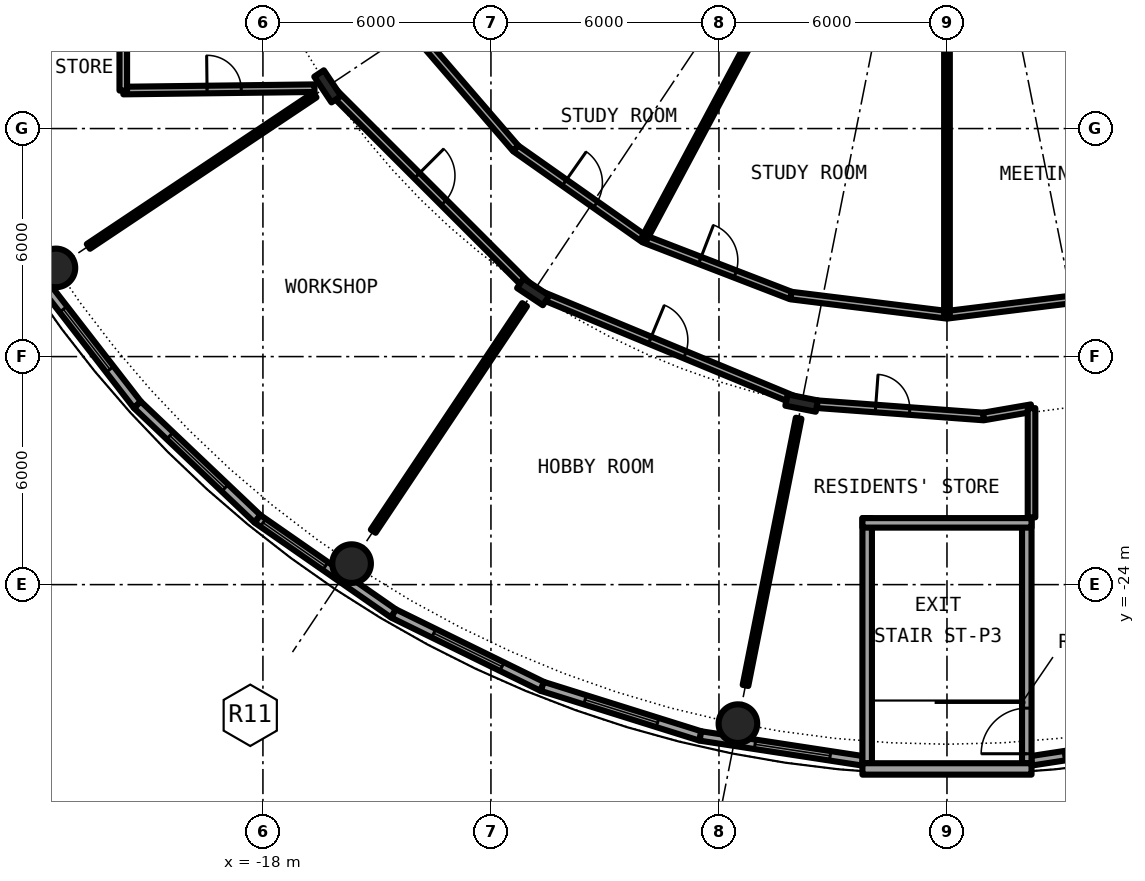
"""IFC4 building model, lengths in metres.
Left out: names, types, materials, properties, quantities, classifications, styles, units other than length and angle.
Written with IfcOpenShell. Run it as: python <this file> out.ifc"""

import sys

from ifc_helpers import new_model, si_unit, direction, frame, frame_2d, origin, origin_2d, place, context, subcontext, project, spatial, rectangle, hollow_circle, i_section, extrude, element, fill, save


model = new_model("IFC4")
c1 = context("Model", 3, precision=1e-05, world=origin(), true_north=direction((0.0, 1.0)))
c2 = subcontext(c1, "Body", "Model", "MODEL_VIEW")
j1 = project(units=[si_unit("LENGTHUNIT", "METRE"), si_unit("PLANEANGLEUNIT", "RADIAN")], contexts=[c1])
p1 = place(None, origin())
s1 = spatial("IfcSite", under=j1, at=p1, CompositionType="ELEMENT")
p2 = place(p1, origin())
s2 = spatial("IfcBuilding", under=s1, at=p2, CompositionType="ELEMENT")
p3 = place(p2, frame((0.0, 0.0, 14.1)))
s3 = spatial("IfcBuildingStorey", under=s2, at=p3, CompositionType="ELEMENT", Elevation=14.1)
for number, where, z_axis, x_axis in (
    (1, (-23.448, -15.667, 0.0), (0.0, 0.0, 1.0), (1.0, 0.0, 0.0)),
    (2, (-15.667, -23.448, 0.0), (0.0, 0.0, 1.0), (1.0, 0.0, 0.0)),
    (3, (-5.501, -27.658, 0.0), (0.0, 0.0, 1.0), (1.0, 0.0, 0.0)),
):
    element("IfcColumn", number, at=place(p3, frame(where, z_axis=z_axis, x_axis=x_axis)), inside=s3, PredefinedType="COLUMN", context=c2, shape_type="SweptSolid", body=[
        extrude(hollow_circle(Radius=0.508, WallThickness=0.05, at=origin_2d()), origin(), (0.0, 0.0, 1.0), 4.2),
    ])
for number, where, z_axis, x_axis in (
    (4, (-16.297, -10.889, 0.0), (0.0, 0.0, 1.0), (-0.831, -0.556, 0.0)),
    (5, (-10.889, -16.297, 0.0), (0.0, 0.0, 1.0), (-0.556, -0.831, 0.0)),
    (6, (-3.824, -19.223, 0.0), (0.0, 0.0, 1.0), (-0.195, -0.981, 0.0)),
):
    element("IfcColumn", number, at=place(p3, frame(where, z_axis=z_axis, x_axis=x_axis)), inside=s3, PredefinedType="COLUMN", context=c2, shape_type="SweptSolid", body=[
        extrude(i_section(OverallWidth=0.303, OverallDepth=0.814, WebThickness=0.021, FlangeThickness=0.04, FilletRadius=0.03, at=origin_2d()), origin(), (0.0, 0.0, 1.0), 4.2),
    ])
p4 = place(p3, frame((-23.975, -15.822, 0.0), z_axis=(0.0, 0.0, 1.0), x_axis=(0.612637256412, -0.790364214812, 0.0)))
e7 = element("IfcWall", 7, at=p4, inside=s3, PredefinedType="SOLIDWALL", context=c2, shape_type="SweptSolid", body=[
    extrude(rectangle(XDim=4.36, YDim=0.25, at=frame_2d((2.18, 0.0))), origin(), (0.0, 0.0, 1.0), 3.8),
])
p5 = place(p4, frame((1.18, 0.0, 0.9)))
e8 = element("IfcOpeningElement", 8, at=p5, cuts=e7, PredefinedType="OPENING", context=c2, shape_type="SweptSolid", body=[
    extrude(rectangle(XDim=2.0, YDim=2.4, at=frame_2d((1.0, 1.2))), frame((0.0, 0.135, 0.0), z_axis=(0.0, -1.0, 0.0), x_axis=(1.0, 0.0, 0.0)), (0.0, 0.0, 1.0), 0.27),
])
p6 = place(p3, frame((-21.304, -19.268, 0.0), z_axis=(0.0, 0.0, 1.0), x_axis=(0.725101501119, -0.68864200647, 0.0)))
e9 = element("IfcWall", 9, at=p6, inside=s3, PredefinedType="SOLIDWALL", context=c2, shape_type="SweptSolid", body=[
    extrude(rectangle(XDim=4.359, YDim=0.25, at=frame_2d((2.18, 0.0))), origin(), (0.0, 0.0, 1.0), 3.8),
])
p7 = place(p6, frame((1.18, 0.0, 0.9)))
e10 = element("IfcOpeningElement", 10, at=p7, cuts=e9, PredefinedType="OPENING", context=c2, shape_type="SweptSolid", body=[
    extrude(rectangle(XDim=2.0, YDim=2.4, at=frame_2d((1.0, 1.2))), frame((0.0, 0.135, 0.0), z_axis=(0.0, -1.0, 0.0), x_axis=(1.0, 0.0, 0.0)), (0.0, 0.0, 1.0), 0.27),
])
p8 = place(p3, frame((-18.143, -22.27, 0.0), z_axis=(0.0, 0.0, 1.0), x_axis=(0.820990800869, -0.57094141984, 0.0)))
e11 = element("IfcWall", 11, at=p8, inside=s3, PredefinedType="SOLIDWALL", context=c2, shape_type="SweptSolid", body=[
    extrude(rectangle(XDim=4.359, YDim=0.25, at=frame_2d((2.18, 0.0))), origin(), (0.0, 0.0, 1.0), 3.8),
])
p9 = place(p8, frame((0.177, 0.0, 0.9)))
e12 = element("IfcOpeningElement", 12, at=p9, cuts=e11, PredefinedType="OPENING", context=c2, shape_type="SweptSolid", body=[
    extrude(rectangle(XDim=2.0, YDim=2.4, at=frame_2d((1.0, 1.2))), frame((0.0, 0.135, 0.0), z_axis=(0.0, -1.0, 0.0), x_axis=(1.0, 0.0, 0.0)), (0.0, 0.0, 1.0), 0.27),
])
p10 = place(p3, frame((-14.564, -24.759, 0.0), z_axis=(0.0, 0.0, 1.0), x_axis=(0.897938079481, -0.440121807478, 0.0)))
e13 = element("IfcWall", 13, at=p10, inside=s3, PredefinedType="SOLIDWALL", context=c2, shape_type="SweptSolid", body=[
    extrude(rectangle(XDim=4.36, YDim=0.25, at=frame_2d((2.18, 0.0))), origin(), (0.0, 0.0, 1.0), 3.8),
])
p11 = place(p10, frame((1.18, 0.0, 0.9)))
e14 = element("IfcOpeningElement", 14, at=p11, cuts=e13, PredefinedType="OPENING", context=c2, shape_type="SweptSolid", body=[
    extrude(rectangle(XDim=2.0, YDim=2.4, at=frame_2d((1.0, 1.2))), frame((0.0, 0.135, 0.0), z_axis=(0.0, -1.0, 0.0), x_axis=(1.0, 0.0, 0.0)), (0.0, 0.0, 1.0), 0.27),
])
p12 = place(p3, frame((-10.649, -26.678, 0.0), z_axis=(0.0, 0.0, 1.0), x_axis=(0.954219534331, -0.299107138498, 0.0)))
e15 = element("IfcWall", 15, at=p12, inside=s3, PredefinedType="SOLIDWALL", context=c2, shape_type="SweptSolid", body=[
    extrude(rectangle(XDim=4.359, YDim=0.25, at=frame_2d((2.18, 0.0))), origin(), (0.0, 0.0, 1.0), 3.8),
])
p13 = place(p12, frame((1.18, 0.0, 0.9)))
e16 = element("IfcOpeningElement", 16, at=p13, cuts=e15, PredefinedType="OPENING", context=c2, shape_type="SweptSolid", body=[
    extrude(rectangle(XDim=2.0, YDim=2.4, at=frame_2d((1.0, 1.2))), frame((0.0, 0.135, 0.0), z_axis=(0.0, -1.0, 0.0), x_axis=(1.0, 0.0, 0.0)), (0.0, 0.0, 1.0), 0.27),
])
p14 = place(p3, frame((-6.489, -27.982, 0.0), z_axis=(0.0, 0.0, 1.0), x_axis=(0.988472895049, -0.151397938406, 0.0)))
e17 = element("IfcWall", 17, at=p14, inside=s3, PredefinedType="SOLIDWALL", context=c2, shape_type="SweptSolid", body=[
    extrude(rectangle(XDim=4.314, YDim=0.25, at=frame_2d((2.157, 0.0))), origin(), (0.0, 0.0, 1.0), 3.8),
])
p15 = place(p14, frame((1.455, 0.0, 0.9)))
e18 = element("IfcOpeningElement", 18, at=p15, cuts=e17, PredefinedType="OPENING", context=c2, shape_type="SweptSolid", body=[
    extrude(rectangle(XDim=2.0, YDim=2.4, at=frame_2d((1.0, 1.2))), frame((0.0, 0.135, 0.0), z_axis=(0.0, -1.0, 0.0), x_axis=(1.0, 0.0, 0.0)), (0.0, 0.0, 1.0), 0.27),
])
p16 = place(p3, frame((2.225, -28.635, 0.0), z_axis=(0.0, 0.0, 1.0), x_axis=(0.988472895049, 0.151397938406, 0.0)))
e19 = element("IfcWall", 19, at=p16, inside=s3, PredefinedType="SOLIDWALL", context=c2, shape_type="SweptSolid", body=[
    extrude(rectangle(XDim=4.314, YDim=0.25, at=frame_2d((2.157, 0.0))), origin(), (0.0, 0.0, 1.0), 3.8),
])
p17 = place(p16, frame((0.859, 0.0, 0.9)))
e20 = element("IfcOpeningElement", 20, at=p17, cuts=e19, PredefinedType="OPENING", context=c2, shape_type="SweptSolid", body=[
    extrude(rectangle(XDim=2.0, YDim=2.4, at=frame_2d((1.0, 1.2))), frame((0.0, 0.135, 0.0), z_axis=(0.0, -1.0, 0.0), x_axis=(1.0, 0.0, 0.0)), (0.0, 0.0, 1.0), 0.27),
])
p18 = place(p3, frame((2.1, -28.7, 0.0), z_axis=(0.0, 0.0, 1.0), x_axis=(0.0, 1.0, 0.0)))
e21 = element("IfcWall", 21, at=p18, inside=s3, PredefinedType="SHEAR", context=c2, shape_type="SweptSolid", body=[
    extrude(rectangle(XDim=6.45, YDim=0.25, at=frame_2d((3.225, 0.0))), origin(), (0.0, 0.0, 1.0), 4.2),
])
p19 = place(p18, frame((0.25, 0.0, 0.0)))
e22 = element("IfcOpeningElement", 22, at=p19, cuts=e21, PredefinedType="OPENING", context=c2, shape_type="SweptSolid", body=[
    extrude(rectangle(XDim=1.2, YDim=2.3, at=frame_2d((0.6, 1.15))), frame((0.0, 0.135, 0.0), z_axis=(0.0, -1.0, 0.0), x_axis=(1.0, 0.0, 0.0)), (0.0, 0.0, 1.0), 0.27),
])
p20 = place(p3, frame((-2.1, -22.25, 0.0), z_axis=(0.0, 0.0, 1.0), x_axis=(0.0, -1.0, 0.0)))
e23 = element("IfcWall", 23, at=p20, inside=s3, PredefinedType="SHEAR", context=c2, shape_type="SweptSolid", body=[
    extrude(rectangle(XDim=6.45, YDim=0.25, at=frame_2d((3.225, 0.0))), origin(), (0.0, 0.0, 1.0), 4.2),
])
p21 = place(p3, frame((-2.225, -22.375, 0.0), z_axis=(0.0, 0.0, 1.0), x_axis=(1.0, 0.0, 0.0)))
e24 = element("IfcWall", 24, at=p21, inside=s3, PredefinedType="SHEAR", context=c2, shape_type="SweptSolid", body=[
    extrude(rectangle(XDim=4.45, YDim=0.25, at=frame_2d((2.225, 0.0))), origin(), (0.0, 0.0, 1.0), 4.2),
])
p22 = place(p3, frame((-2.225, -28.85, 0.0), z_axis=(0.0, 0.0, 1.0), x_axis=(1.0, 0.0, 0.0)))
e25 = element("IfcWall", 25, at=p22, inside=s3, PredefinedType="SHEAR", context=c2, shape_type="SweptSolid", body=[
    extrude(rectangle(XDim=4.45, YDim=0.3, at=frame_2d((2.225, 0.0))), origin(), (0.0, 0.0, 1.0), 4.2),
])
p23 = place(p3, frame((-3.671, -19.234, 0.0), z_axis=(0.0, 0.0, 1.0), x_axis=(0.997285649759, -0.073629700427, 0.0)))
e26 = element("IfcWall", 26, at=p23, inside=s3, PredefinedType="PARTITIONING", context=c2, shape_type="SweptSolid", body=[
    extrude(rectangle(XDim=4.646, YDim=0.2, at=frame_2d((2.323, 0.0))), origin(), (0.0, 0.0, 1.0), 3.38),
])
p24 = place(p23, frame((1.796, 0.0, 0.0)))
e27 = element("IfcOpeningElement", 27, at=p24, cuts=e26, PredefinedType="OPENING", context=c2, shape_type="SweptSolid", body=[
    extrude(rectangle(XDim=0.9, YDim=2.3, at=frame_2d((0.45, 1.15))), frame((0.0, 0.11, 0.0), z_axis=(0.0, -1.0, 0.0), x_axis=(1.0, 0.0, 0.0)), (0.0, 0.0, 1.0), 0.22),
])
p25 = place(p3, frame((0.962, -19.576, 0.0), z_axis=(0.0, 0.0, 1.0), x_axis=(0.985302465297, 0.170818769109, 0.0)))
e28 = element("IfcWall", 28, at=p25, inside=s3, PredefinedType="PARTITIONING", context=c2, shape_type="SweptSolid", body=[
    extrude(rectangle(XDim=1.282, YDim=0.2, at=frame_2d((0.641, 0.0))), origin(), (0.0, 0.0, 1.0), 3.38),
])
p26 = place(p3, frame((-16.188, -10.998, 0.0), z_axis=(0.0, 0.0, 1.0), x_axis=(0.707106781187, -0.707106781187, 0.0)))
e29 = element("IfcWall", 29, at=p26, inside=s3, PredefinedType="PARTITIONING", context=c2, shape_type="SweptSolid", body=[
    extrude(rectangle(XDim=7.34, YDim=0.2, at=frame_2d((3.67, 0.0))), origin(), (0.0, 0.0, 1.0), 3.38),
])
p27 = place(p26, frame((3.17, 0.0, 0.0)))
e30 = element("IfcOpeningElement", 30, at=p27, cuts=e29, PredefinedType="OPENING", context=c2, shape_type="SweptSolid", body=[
    extrude(rectangle(XDim=1.0, YDim=2.3, at=frame_2d((0.5, 1.15))), frame((0.0, 0.11, 0.0), z_axis=(0.0, -1.0, 0.0), x_axis=(1.0, 0.0, 0.0)), (0.0, 0.0, 1.0), 0.22),
])
p28 = place(p3, frame((-10.747, -16.356, 0.0), z_axis=(0.0, 0.0, 1.0), x_axis=(0.923912243701, -0.382604451019, 0.0)))
e31 = element("IfcWall", 31, at=p28, inside=s3, PredefinedType="PARTITIONING", context=c2, shape_type="SweptSolid", body=[
    extrude(rectangle(XDim=7.339, YDim=0.2, at=frame_2d((3.67, 0.0))), origin(), (0.0, 0.0, 1.0), 3.38),
])
p29 = place(p28, frame((3.17, 0.0, 0.0)))
e32 = element("IfcOpeningElement", 32, at=p29, cuts=e31, PredefinedType="OPENING", context=c2, shape_type="SweptSolid", body=[
    extrude(rectangle(XDim=1.0, YDim=2.3, at=frame_2d((0.5, 1.15))), frame((0.0, 0.11, 0.0), z_axis=(0.0, -1.0, 0.0), x_axis=(1.0, 0.0, 0.0)), (0.0, 0.0, 1.0), 0.22),
])
p30 = place(p3, frame((-14.043, -9.4, 0.0), z_axis=(0.0, 0.0, 1.0), x_axis=(0.653274518104, -0.757121129012, 0.0)))
e33 = element("IfcWall", 33, at=p30, inside=s3, PredefinedType="PARTITIONING", context=c2, shape_type="SweptSolid", body=[
    extrude(rectangle(XDim=4.124, YDim=0.2, at=frame_2d((2.062, 0.0))), origin(), (0.0, 0.0, 1.0), 3.8),
])
p31 = place(p3, frame((-11.349, -12.522, 0.0), z_axis=(0.0, 0.0, 1.0), x_axis=(0.817567680547, -0.575832517079, 0.0)))
e34 = element("IfcWall", 34, at=p31, inside=s3, PredefinedType="PARTITIONING", context=c2, shape_type="SweptSolid", body=[
    extrude(rectangle(XDim=4.137, YDim=0.2, at=frame_2d((2.068, 0.0))), origin(), (0.0, 0.0, 1.0), 3.8),
])
p32 = place(p31, frame((1.568, 0.0, 0.0)))
e35 = element("IfcOpeningElement", 35, at=p32, cuts=e34, PredefinedType="OPENING", context=c2, shape_type="SweptSolid", body=[
    extrude(rectangle(XDim=1.0, YDim=2.3, at=frame_2d((0.5, 1.15))), frame((0.0, 0.11, 0.0), z_axis=(0.0, -1.0, 0.0), x_axis=(1.0, 0.0, 0.0)), (0.0, 0.0, 1.0), 0.22),
])
p33 = place(p3, frame((-7.967, -14.904, 0.0), z_axis=(0.0, 0.0, 1.0), x_axis=(0.932943640288, -0.360022449363, 0.0)))
e36 = element("IfcWall", 36, at=p33, inside=s3, PredefinedType="PARTITIONING", context=c2, shape_type="SweptSolid", body=[
    extrude(rectangle(XDim=4.139, YDim=0.2, at=frame_2d((2.069, 0.0))), origin(), (0.0, 0.0, 1.0), 3.8),
])
p34 = place(p33, frame((1.569, 0.0, 0.0)))
e37 = element("IfcOpeningElement", 37, at=p34, cuts=e36, PredefinedType="OPENING", context=c2, shape_type="SweptSolid", body=[
    extrude(rectangle(XDim=1.0, YDim=2.3, at=frame_2d((0.5, 1.15))), frame((0.0, 0.11, 0.0), z_axis=(0.0, -1.0, 0.0), x_axis=(1.0, 0.0, 0.0)), (0.0, 0.0, 1.0), 0.22),
])
for number, where, z_axis, x_axis in (
    (38, (-4.106, -16.394, 0.0), (0.0, 0.0, 1.0), (0.992, -0.122, 0.0)),
    (39, (0.0, -16.9, 0.0), (0.0, 0.0, 1.0), (0.992, 0.122, 0.0)),
):
    element("IfcWall", number, at=place(p3, frame(where, z_axis=z_axis, x_axis=x_axis)), inside=s3, PredefinedType="PARTITIONING", context=c2, shape_type="SweptSolid", body=[
        extrude(rectangle(XDim=4.137, YDim=0.2, at=frame_2d((2.068, 0.0))), origin(), (0.0, 0.0, 1.0), 3.8),
    ])
p35 = place(p3, frame((-21.675, -11.0, 0.0), z_axis=(0.0, 0.0, 1.0), x_axis=(0.999924074118, 0.012322580895, 0.0)))
e40 = element("IfcWall", 40, at=p35, inside=s3, PredefinedType="PARTITIONING", context=c2, shape_type="SweptSolid", body=[
    extrude(rectangle(XDim=5.032, YDim=0.2, at=frame_2d((2.516, 0.0))), origin(), (0.0, 0.0, 1.0), 3.8),
])
p36 = place(p35, frame((2.205, 0.0, 0.0)))
e41 = element("IfcOpeningElement", 41, at=p36, cuts=e40, PredefinedType="OPENING", context=c2, shape_type="SweptSolid", body=[
    extrude(rectangle(XDim=0.9, YDim=2.3, at=frame_2d((0.45, 1.15))), frame((0.0, 0.11, 0.0), z_axis=(0.0, -1.0, 0.0), x_axis=(1.0, 0.0, 0.0)), (0.0, 0.0, 1.0), 0.22),
])
p37 = place(p3, frame((2.225, -22.23, 0.0), z_axis=(0.0, 0.0, 1.0), x_axis=(0.0, 1.0, 0.0)))
e42 = element("IfcWall", 42, at=p37, inside=s3, PredefinedType="PARTITIONING", context=c2, shape_type="SweptSolid", body=[
    extrude(rectangle(XDim=2.873, YDim=0.2, at=frame_2d((1.437, 0.0))), origin(), (0.0, 0.0, 1.0), 3.8),
])
p38 = place(p3, frame((-22.593, -15.101, 0.0), z_axis=(0.0, 0.0, 1.0), x_axis=(0.831415754305, 0.555650828752, 0.0)))
e43 = element("IfcWall", 43, at=p38, inside=s3, PredefinedType="PARTITIONING", context=c2, shape_type="SweptSolid", body=[
    extrude(rectangle(XDim=7.168, YDim=0.15, at=frame_2d((3.584, 0.0))), origin(), (0.0, 0.0, 1.0), 3.8),
])
p39 = place(p3, frame((-15.098, -22.595, 0.0), z_axis=(0.0, 0.0, 1.0), x_axis=(0.555627285648, 0.831431488123, 0.0)))
e44 = element("IfcWall", 44, at=p39, inside=s3, PredefinedType="PARTITIONING", context=c2, shape_type="SweptSolid", body=[
    extrude(rectangle(XDim=7.168, YDim=0.15, at=frame_2d((3.584, 0.0))), origin(), (0.0, 0.0, 1.0), 3.8),
])
p40 = place(p3, frame((-7.967, -14.904, 0.0), z_axis=(0.0, 0.0, 1.0), x_axis=(0.471460365694, 0.881887251059, 0.0)))
e45 = element("IfcWall", 45, at=p40, inside=s3, PredefinedType="PARTITIONING", context=c2, shape_type="SweptSolid", body=[
    extrude(rectangle(XDim=9.18, YDim=0.15, at=frame_2d((4.59, 0.0))), origin(), (0.0, 0.0, 1.0), 3.8),
])
p41 = place(p3, frame((-5.302, -26.653, 0.0), z_axis=(0.0, 0.0, 1.0), x_axis=(0.195166281073, 0.98077016815, 0.0)))
e46 = element("IfcWall", 46, at=p41, inside=s3, PredefinedType="PARTITIONING", context=c2, shape_type="SweptSolid", body=[
    extrude(rectangle(XDim=7.168, YDim=0.15, at=frame_2d((3.584, 0.0))), origin(), (0.0, 0.0, 1.0), 3.8),
])
p42 = place(p3, frame((0.0, -16.9, 0.0), z_axis=(0.0, 0.0, 1.0), x_axis=(0.0, 1.0, 0.0)))
e47 = element("IfcWall", 47, at=p42, inside=s3, PredefinedType="PARTITIONING", context=c2, shape_type="SweptSolid", body=[
    extrude(rectangle(XDim=9.18, YDim=0.15, at=frame_2d((4.59, 0.0))), origin(), (0.0, 0.0, 1.0), 3.8),
])
p43 = place(p3, frame((-21.675, -11.0, 0.0), z_axis=(0.0, 0.0, 1.0), x_axis=(0.0, 1.0, 0.0)))
e48 = element("IfcWall", 48, at=p43, inside=s3, PredefinedType="PARTITIONING", context=c2, shape_type="SweptSolid", body=[
    extrude(rectangle(XDim=1.6, YDim=0.2, at=frame_2d((0.8, 0.0))), origin(), (0.0, 0.0, 1.0), 3.8),
])
p44 = place(p5, origin())
e49 = element("IfcWindow", 49, at=p44, inside=s3, PartitioningType="SINGLE_PANEL", PredefinedType="WINDOW", context=c2, shape_type="SweptSolid", body=[
    extrude(rectangle(XDim=2.0, YDim=2.4, at=frame_2d((1.0, 1.2))), frame((0.0, 0.03, 0.0), z_axis=(0.0, -1.0, 0.0), x_axis=(1.0, 0.0, 0.0)), (0.0, 0.0, 1.0), 0.06),
])
fill(e8, e49)
p45 = place(p7, origin())
e50 = element("IfcWindow", 50, at=p45, inside=s3, PartitioningType="SINGLE_PANEL", PredefinedType="WINDOW", context=c2, shape_type="SweptSolid", body=[
    extrude(rectangle(XDim=2.0, YDim=2.4, at=frame_2d((1.0, 1.2))), frame((0.0, 0.03, 0.0), z_axis=(0.0, -1.0, 0.0), x_axis=(1.0, 0.0, 0.0)), (0.0, 0.0, 1.0), 0.06),
])
fill(e10, e50)
p46 = place(p9, origin())
e51 = element("IfcWindow", 51, at=p46, inside=s3, PartitioningType="SINGLE_PANEL", PredefinedType="WINDOW", context=c2, shape_type="SweptSolid", body=[
    extrude(rectangle(XDim=2.0, YDim=2.4, at=frame_2d((1.0, 1.2))), frame((0.0, 0.03, 0.0), z_axis=(0.0, -1.0, 0.0), x_axis=(1.0, 0.0, 0.0)), (0.0, 0.0, 1.0), 0.06),
])
fill(e12, e51)
p47 = place(p11, origin())
e52 = element("IfcWindow", 52, at=p47, inside=s3, PartitioningType="SINGLE_PANEL", PredefinedType="WINDOW", context=c2, shape_type="SweptSolid", body=[
    extrude(rectangle(XDim=2.0, YDim=2.4, at=frame_2d((1.0, 1.2))), frame((0.0, 0.03, 0.0), z_axis=(0.0, -1.0, 0.0), x_axis=(1.0, 0.0, 0.0)), (0.0, 0.0, 1.0), 0.06),
])
fill(e14, e52)
p48 = place(p13, origin())
e53 = element("IfcWindow", 53, at=p48, inside=s3, PartitioningType="SINGLE_PANEL", PredefinedType="WINDOW", context=c2, shape_type="SweptSolid", body=[
    extrude(rectangle(XDim=2.0, YDim=2.4, at=frame_2d((1.0, 1.2))), frame((0.0, 0.03, 0.0), z_axis=(0.0, -1.0, 0.0), x_axis=(1.0, 0.0, 0.0)), (0.0, 0.0, 1.0), 0.06),
])
fill(e16, e53)
p49 = place(p15, origin())
e54 = element("IfcWindow", 54, at=p49, inside=s3, PartitioningType="SINGLE_PANEL", PredefinedType="WINDOW", context=c2, shape_type="SweptSolid", body=[
    extrude(rectangle(XDim=2.0, YDim=2.4, at=frame_2d((1.0, 1.2))), frame((0.0, 0.03, 0.0), z_axis=(0.0, -1.0, 0.0), x_axis=(1.0, 0.0, 0.0)), (0.0, 0.0, 1.0), 0.06),
])
fill(e18, e54)
p50 = place(p17, origin())
e55 = element("IfcWindow", 55, at=p50, inside=s3, PartitioningType="SINGLE_PANEL", PredefinedType="WINDOW", context=c2, shape_type="SweptSolid", body=[
    extrude(rectangle(XDim=2.0, YDim=2.4, at=frame_2d((1.0, 1.2))), frame((0.0, 0.03, 0.0), z_axis=(0.0, -1.0, 0.0), x_axis=(1.0, 0.0, 0.0)), (0.0, 0.0, 1.0), 0.06),
])
fill(e20, e55)
p51 = place(p19, origin())
e56 = element("IfcDoor", 56, at=p51, inside=s3, OperationType="SINGLE_SWING_RIGHT", PredefinedType="DOOR", context=c2, shape_type="SweptSolid", body=[
    extrude(rectangle(XDim=1.2, YDim=2.3, at=frame_2d((0.6, 1.15))), frame((0.0, 0.025, 0.0), z_axis=(0.0, -1.0, 0.0), x_axis=(1.0, 0.0, 0.0)), (0.0, 0.0, 1.0), 0.05),
])
fill(e22, e56)
p52 = place(p27, origin())
e57 = element("IfcDoor", 57, at=p52, inside=s3, OperationType="SINGLE_SWING_RIGHT", PredefinedType="DOOR", context=c2, shape_type="SweptSolid", body=[
    extrude(rectangle(XDim=1.0, YDim=2.3, at=frame_2d((0.5, 1.15))), frame((0.0, 0.025, 0.0), z_axis=(0.0, -1.0, 0.0), x_axis=(1.0, 0.0, 0.0)), (0.0, 0.0, 1.0), 0.05),
])
fill(e30, e57)
p53 = place(p29, origin())
e58 = element("IfcDoor", 58, at=p53, inside=s3, OperationType="SINGLE_SWING_RIGHT", PredefinedType="DOOR", context=c2, shape_type="SweptSolid", body=[
    extrude(rectangle(XDim=1.0, YDim=2.3, at=frame_2d((0.5, 1.15))), frame((0.0, 0.025, 0.0), z_axis=(0.0, -1.0, 0.0), x_axis=(1.0, 0.0, 0.0)), (0.0, 0.0, 1.0), 0.05),
])
fill(e32, e58)
p54 = place(p24, origin())
e59 = element("IfcDoor", 59, at=p54, inside=s3, OperationType="SINGLE_SWING_LEFT", PredefinedType="DOOR", context=c2, shape_type="SweptSolid", body=[
    extrude(rectangle(XDim=0.9, YDim=2.3, at=frame_2d((0.45, 1.15))), frame((0.0, 0.025, 0.0), z_axis=(0.0, -1.0, 0.0), x_axis=(1.0, 0.0, 0.0)), (0.0, 0.0, 1.0), 0.05),
])
fill(e27, e59)
p55 = place(p32, origin())
e60 = element("IfcDoor", 60, at=p55, inside=s3, OperationType="SINGLE_SWING_RIGHT", PredefinedType="DOOR", context=c2, shape_type="SweptSolid", body=[
    extrude(rectangle(XDim=1.0, YDim=2.3, at=frame_2d((0.5, 1.15))), frame((0.0, 0.025, 0.0), z_axis=(0.0, -1.0, 0.0), x_axis=(1.0, 0.0, 0.0)), (0.0, 0.0, 1.0), 0.05),
])
fill(e35, e60)
p56 = place(p34, origin())
e61 = element("IfcDoor", 61, at=p56, inside=s3, OperationType="SINGLE_SWING_LEFT", PredefinedType="DOOR", context=c2, shape_type="SweptSolid", body=[
    extrude(rectangle(XDim=1.0, YDim=2.3, at=frame_2d((0.5, 1.15))), frame((0.0, 0.025, 0.0), z_axis=(0.0, -1.0, 0.0), x_axis=(1.0, 0.0, 0.0)), (0.0, 0.0, 1.0), 0.05),
])
fill(e37, e61)
p57 = place(p36, origin())
e62 = element("IfcDoor", 62, at=p57, inside=s3, OperationType="SINGLE_SWING_RIGHT", PredefinedType="DOOR", context=c2, shape_type="SweptSolid", body=[
    extrude(rectangle(XDim=0.9, YDim=2.3, at=frame_2d((0.45, 1.15))), frame((0.0, 0.025, 0.0), z_axis=(0.0, -1.0, 0.0), x_axis=(1.0, 0.0, 0.0)), (0.0, 0.0, 1.0), 0.05),
])
fill(e41, e62)
save(model, sys.argv[1])
